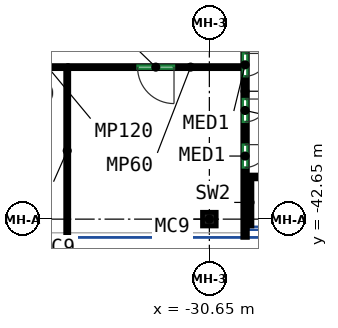
"""IFC4 building model, lengths in metres.
Left out: names, types, materials, properties, quantities, classifications, styles, units other than length and angle.
Written with IfcOpenShell. Run it as: python <this file> out.ifc"""

import sys

from ifc_helpers import new_model, si_unit, direction, frame, frame_2d, origin, origin_2d, place, context, subcontext, project, spatial, rectangle, extrude, source, transform, mapped, element, fill, save


model = new_model("IFC4")
c1 = context("Model", 3, precision=1e-05, world=origin(), true_north=direction((0.0, 1.0)))
c2 = subcontext(c1, "Body", "Model", "MODEL_VIEW")
j1 = project(units=[si_unit("LENGTHUNIT", "METRE"), si_unit("PLANEANGLEUNIT", "RADIAN")], contexts=[c1])
p1 = place(None, origin())
s1 = spatial("IfcSite", under=j1, at=p1, CompositionType="ELEMENT")
p2 = place(p1, origin())
s2 = spatial("IfcBuilding", under=s1, at=p2, CompositionType="ELEMENT")
p3 = place(p2, origin())
s3 = spatial("IfcBuildingStorey", under=s2, at=p3, CompositionType="ELEMENT", Elevation=0.0)
m1 = source(origin(), c2, "Body", "SweptSolid", [
    extrude(rectangle(XDim=0.9, YDim=0.9, at=origin_2d()), origin(), (0.0, 0.0, 1.0), 8.6),
])
p4 = place(p3, frame((-30.65, -42.65, 0.0), z_axis=(0.0, 0.0, 1.0), x_axis=(1.0, 0.0, 0.0)))
e1 = element("IfcColumn", 1, at=p4, inside=s3, PredefinedType="COLUMN", context=c2, shape_type="MappedRepresentation", body=[
    mapped(m1, transform((0.0, 0.0, 0.0))),
])
m2 = source(origin(), c2, "Body", "SweptSolid", [
    extrude(rectangle(XDim=19.226, YDim=0.3, at=frame_2d((9.613, 0.0))), origin(), (0.0, 0.0, 1.0), 8.6),
])
p5 = place(p3, frame((-28.3, -24.624, 0.0), z_axis=(0.0, 0.0, 1.0), x_axis=(0.0, -1.0, 0.0)))
e2 = element("IfcWall", 2, at=p5, inside=s3, PredefinedType="SOLIDWALL", context=c2, shape_type="MappedRepresentation", body=[
    mapped(m2, transform((0.0, 0.0, 0.0))),
])
p6 = place(p5, frame((13.126, 0.0, 0.0)))
e3 = element("IfcOpeningElement", 3, at=p6, cuts=e2, PredefinedType="OPENING", context=c2, shape_type="SweptSolid", body=[
    extrude(rectangle(XDim=1.5, YDim=2.4, at=frame_2d((0.75, 1.2))), frame((0.0, 0.16, 0.0), z_axis=(0.0, -1.0, 0.0), x_axis=(1.0, 0.0, 0.0)), (0.0, 0.0, 1.0), 0.32),
])
p7 = place(p5, frame((7.126, 0.0, 0.0)))
e4 = element("IfcOpeningElement", 4, at=p7, cuts=e2, PredefinedType="OPENING", context=c2, shape_type="SweptSolid", body=[
    extrude(rectangle(XDim=1.5, YDim=2.4, at=frame_2d((0.75, 1.2))), frame((0.0, 0.16, 0.0), z_axis=(0.0, -1.0, 0.0), x_axis=(1.0, 0.0, 0.0)), (0.0, 0.0, 1.0), 0.32),
])
p8 = place(p5, frame((10.126, 0.0, 0.0)))
e5 = element("IfcOpeningElement", 5, at=p8, cuts=e2, PredefinedType="OPENING", context=c2, shape_type="SweptSolid", body=[
    extrude(rectangle(XDim=1.5, YDim=2.4, at=frame_2d((0.75, 1.2))), frame((0.0, 0.16, 0.0), z_axis=(0.0, -1.0, 0.0), x_axis=(1.0, 0.0, 0.0)), (0.0, 0.0, 1.0), 0.32),
])
p9 = place(p5, frame((2.413, 0.0, 0.6)))
e6 = element("IfcOpeningElement", 6, at=p9, cuts=e2, PredefinedType="OPENING", context=c2, shape_type="SweptSolid", body=[
    extrude(rectangle(XDim=2.4, YDim=3.0, at=frame_2d((1.2, 1.5))), frame((0.0, 0.16, 0.0), z_axis=(0.0, -1.0, 0.0), x_axis=(1.0, 0.0, 0.0)), (0.0, 0.0, 1.0), 0.32),
])
p10 = place(p5, frame((2.413, 0.0, 5.0)))
e7 = element("IfcOpeningElement", 7, at=p10, cuts=e2, PredefinedType="OPENING", context=c2, shape_type="SweptSolid", body=[
    extrude(rectangle(XDim=2.4, YDim=2.0, at=frame_2d((1.2, 1.0))), frame((0.0, 0.16, 0.0), z_axis=(0.0, -1.0, 0.0), x_axis=(1.0, 0.0, 0.0)), (0.0, 0.0, 1.0), 0.32),
])
m3 = source(origin(), c2, "Body", "SweptSolid", [
    extrude(rectangle(XDim=28.7, YDim=0.3, at=frame_2d((14.35, 0.0))), origin(), (0.0, 0.0, 1.0), 8.6),
])
p11 = place(p3, frame((-28.45, -43.7, 0.0), z_axis=(0.0, 0.0, 1.0), x_axis=(-1.0, 0.0, 0.0)))
e8 = element("IfcWall", 8, at=p11, inside=s3, PredefinedType="SOLIDWALL", context=c2, shape_type="MappedRepresentation", body=[
    mapped(m3, transform((0.0, 0.0, 0.0))),
])
p12 = place(p11, frame((23.8, 0.0, 0.0)))
e9 = element("IfcOpeningElement", 9, at=p12, cuts=e8, PredefinedType="OPENING", context=c2, shape_type="SweptSolid", body=[
    extrude(rectangle(XDim=1.5, YDim=2.4, at=frame_2d((0.75, 1.2))), frame((0.0, 0.16, 0.0), z_axis=(0.0, -1.0, 0.0), x_axis=(1.0, 0.0, 0.0)), (0.0, 0.0, 1.0), 0.32),
])
p13 = place(p11, frame((3.8, 0.0, 0.0)))
e10 = element("IfcOpeningElement", 10, at=p13, cuts=e8, PredefinedType="OPENING", context=c2, shape_type="SweptSolid", body=[
    extrude(rectangle(XDim=1.5, YDim=2.4, at=frame_2d((0.75, 1.2))), frame((0.0, 0.16, 0.0), z_axis=(0.0, -1.0, 0.0), x_axis=(1.0, 0.0, 0.0)), (0.0, 0.0, 1.0), 0.32),
])
p14 = place(p11, frame((15.05, 0.0, 0.0)))
e11 = element("IfcOpeningElement", 11, at=p14, cuts=e8, PredefinedType="OPENING", context=c2, shape_type="SweptSolid", body=[
    extrude(rectangle(XDim=6.0, YDim=4.2, at=frame_2d((3.0, 2.1))), frame((0.0, 0.16, 0.0), z_axis=(0.0, -1.0, 0.0), x_axis=(1.0, 0.0, 0.0)), (0.0, 0.0, 1.0), 0.32),
])
p15 = place(p11, frame((7.15, 0.0, 0.6)))
e12 = element("IfcOpeningElement", 12, at=p15, cuts=e8, PredefinedType="OPENING", context=c2, shape_type="SweptSolid", body=[
    extrude(rectangle(XDim=2.4, YDim=3.0, at=frame_2d((1.2, 1.5))), frame((0.0, 0.16, 0.0), z_axis=(0.0, -1.0, 0.0), x_axis=(1.0, 0.0, 0.0)), (0.0, 0.0, 1.0), 0.32),
])
p16 = place(p11, frame((7.15, 0.0, 5.0)))
e13 = element("IfcOpeningElement", 13, at=p16, cuts=e8, PredefinedType="OPENING", context=c2, shape_type="SweptSolid", body=[
    extrude(rectangle(XDim=2.4, YDim=2.0, at=frame_2d((1.2, 1.0))), frame((0.0, 0.16, 0.0), z_axis=(0.0, -1.0, 0.0), x_axis=(1.0, 0.0, 0.0)), (0.0, 0.0, 1.0), 0.32),
])
m4 = source(origin(), c2, "Body", "SweptSolid", [
    extrude(rectangle(XDim=2.55, YDim=0.2, at=frame_2d((1.275, 0.0))), origin(), (0.0, 0.0, 1.0), 7.7),
])
p17 = place(p3, frame((-40.0, -32.65, 0.0), z_axis=(0.0, 0.0, 1.0), x_axis=(-1.0, 0.0, 0.0)))
e14 = element("IfcWall", 14, at=p17, inside=s3, PredefinedType="PARTITIONING", context=c2, shape_type="MappedRepresentation", body=[
    mapped(m4, transform((0.0, 0.0, 0.0))),
])
m5 = source(origin(), c2, "Body", "SweptSolid", [
    extrude(rectangle(XDim=10.8, YDim=0.2, at=frame_2d((5.4, 0.0))), origin(), (0.0, 0.0, 1.0), 7.7),
])
p18 = place(p3, frame((-40.0, -32.75, 0.0), z_axis=(0.0, 0.0, 1.0), x_axis=(0.0, -1.0, 0.0)))
e15 = element("IfcWall", 15, at=p18, inside=s3, PredefinedType="PARTITIONING", context=c2, shape_type="MappedRepresentation", body=[
    mapped(m5, transform((0.0, 0.0, 0.0))),
])
m6 = source(origin(), c2, "Body", "SweptSolid", [
    extrude(rectangle(XDim=11.45, YDim=0.2, at=frame_2d((5.725, 0.0))), origin(), (0.0, 0.0, 1.0), 7.7),
])
p19 = place(p3, frame((-28.45, -32.65, 0.0), z_axis=(0.0, 0.0, 1.0), x_axis=(-1.0, 0.0, 0.0)))
e16 = element("IfcWall", 16, at=p19, inside=s3, PredefinedType="PARTITIONING", context=c2, shape_type="MappedRepresentation", body=[
    mapped(m6, transform((0.0, 0.0, 0.0))),
])
p20 = place(p19, frame((4.525, 0.0, 0.0)))
e17 = element("IfcOpeningElement", 17, at=p20, cuts=e16, PredefinedType="OPENING", context=c2, shape_type="SweptSolid", body=[
    extrude(rectangle(XDim=2.4, YDim=2.4, at=frame_2d((1.2, 1.2))), frame((0.0, 0.11, 0.0), z_axis=(0.0, -1.0, 0.0), x_axis=(1.0, 0.0, 0.0)), (0.0, 0.0, 1.0), 0.22),
])
m7 = source(origin(), c2, "Body", "SweptSolid", [
    extrude(rectangle(XDim=6.9, YDim=0.25, at=frame_2d((3.45, 0.0))), origin(), (0.0, 0.0, 1.0), 4.0),
])
for number, where, z_axis, x_axis in (
    (18, (-28.1, -43.225, 0.0), (0.0, 0.0, 1.0), (1.0, 0.0, 0.0)),
    (19, (-28.1, -39.875, 0.0), (0.0, 0.0, 1.0), (1.0, 0.0, 0.0)),
):
    element("IfcWall", number, at=place(p3, frame(where, z_axis=z_axis, x_axis=x_axis)), inside=s3, PredefinedType="SHEAR", context=c2, shape_type="MappedRepresentation", body=[
        mapped(m7, transform((0.0, 0.0, 0.0))),
    ])
m8 = source(origin(), c2, "Body", "SweptSolid", [
    extrude(rectangle(XDim=3.1, YDim=0.25, at=frame_2d((1.55, 0.0))), origin(), (0.0, 0.0, 1.0), 4.0),
])
p21 = place(p3, frame((-27.975, -43.1, 0.0), z_axis=(0.0, 0.0, 1.0), x_axis=(0.0, 1.0, 0.0)))
e20 = element("IfcWall", 20, at=p21, inside=s3, PredefinedType="SHEAR", context=c2, shape_type="MappedRepresentation", body=[
    mapped(m8, transform((0.0, 0.0, 0.0))),
])
p22 = place(p13, origin())
e21 = element("IfcDoor", 21, at=p22, inside=s3, OperationType="DOUBLE_DOOR_SINGLE_SWING", PredefinedType="DOOR", context=c2, shape_type="SweptSolid", body=[
    extrude(rectangle(XDim=1.5, YDim=2.4, at=frame_2d((0.75, 1.2))), frame((0.0, 0.025, 0.0), z_axis=(0.0, -1.0, 0.0), x_axis=(1.0, 0.0, 0.0)), (0.0, 0.0, 1.0), 0.05),
])
fill(e10, e21)
p23 = place(p6, origin())
e22 = element("IfcDoor", 22, at=p23, inside=s3, OperationType="DOUBLE_DOOR_SINGLE_SWING", PredefinedType="DOOR", context=c2, shape_type="SweptSolid", body=[
    extrude(rectangle(XDim=1.5, YDim=2.4, at=frame_2d((0.75, 1.2))), frame((0.0, 0.025, 0.0), z_axis=(0.0, -1.0, 0.0), x_axis=(1.0, 0.0, 0.0)), (0.0, 0.0, 1.0), 0.05),
])
fill(e3, e22)
p24 = place(p7, origin())
e23 = element("IfcDoor", 23, at=p24, inside=s3, OperationType="DOUBLE_DOOR_SINGLE_SWING", PredefinedType="DOOR", context=c2, shape_type="SweptSolid", body=[
    extrude(rectangle(XDim=1.5, YDim=2.4, at=frame_2d((0.75, 1.2))), frame((0.0, 0.025, 0.0), z_axis=(0.0, -1.0, 0.0), x_axis=(1.0, 0.0, 0.0)), (0.0, 0.0, 1.0), 0.05),
])
fill(e4, e23)
p25 = place(p8, origin())
e24 = element("IfcDoor", 24, at=p25, inside=s3, OperationType="DOUBLE_DOOR_SINGLE_SWING", PredefinedType="DOOR", context=c2, shape_type="SweptSolid", body=[
    extrude(rectangle(XDim=1.5, YDim=2.4, at=frame_2d((0.75, 1.2))), frame((0.0, 0.025, 0.0), z_axis=(0.0, -1.0, 0.0), x_axis=(1.0, 0.0, 0.0)), (0.0, 0.0, 1.0), 0.05),
])
fill(e5, e24)
p26 = place(p15, origin())
e25 = element("IfcWindow", 25, at=p26, inside=s3, PartitioningType="SINGLE_PANEL", PredefinedType="WINDOW", context=c2, shape_type="SweptSolid", body=[
    extrude(rectangle(XDim=2.4, YDim=3.0, at=frame_2d((1.2, 1.5))), frame((0.0, 0.03, 0.0), z_axis=(0.0, -1.0, 0.0), x_axis=(1.0, 0.0, 0.0)), (0.0, 0.0, 1.0), 0.06),
])
fill(e12, e25)
p27 = place(p16, origin())
e26 = element("IfcWindow", 26, at=p27, inside=s3, PartitioningType="SINGLE_PANEL", PredefinedType="WINDOW", context=c2, shape_type="SweptSolid", body=[
    extrude(rectangle(XDim=2.4, YDim=2.0, at=frame_2d((1.2, 1.0))), frame((0.0, 0.03, 0.0), z_axis=(0.0, -1.0, 0.0), x_axis=(1.0, 0.0, 0.0)), (0.0, 0.0, 1.0), 0.06),
])
fill(e13, e26)
p28 = place(p20, origin())
e27 = element("IfcDoor", 27, at=p28, inside=s3, OperationType="DOUBLE_DOOR_SINGLE_SWING", PredefinedType="DOOR", context=c2, shape_type="SweptSolid", body=[
    extrude(rectangle(XDim=2.4, YDim=2.4, at=frame_2d((1.2, 1.2))), frame((0.0, 0.025, 0.0), z_axis=(0.0, -1.0, 0.0), x_axis=(1.0, 0.0, 0.0)), (0.0, 0.0, 1.0), 0.05),
])
fill(e17, e27)
save(model, sys.argv[1])
